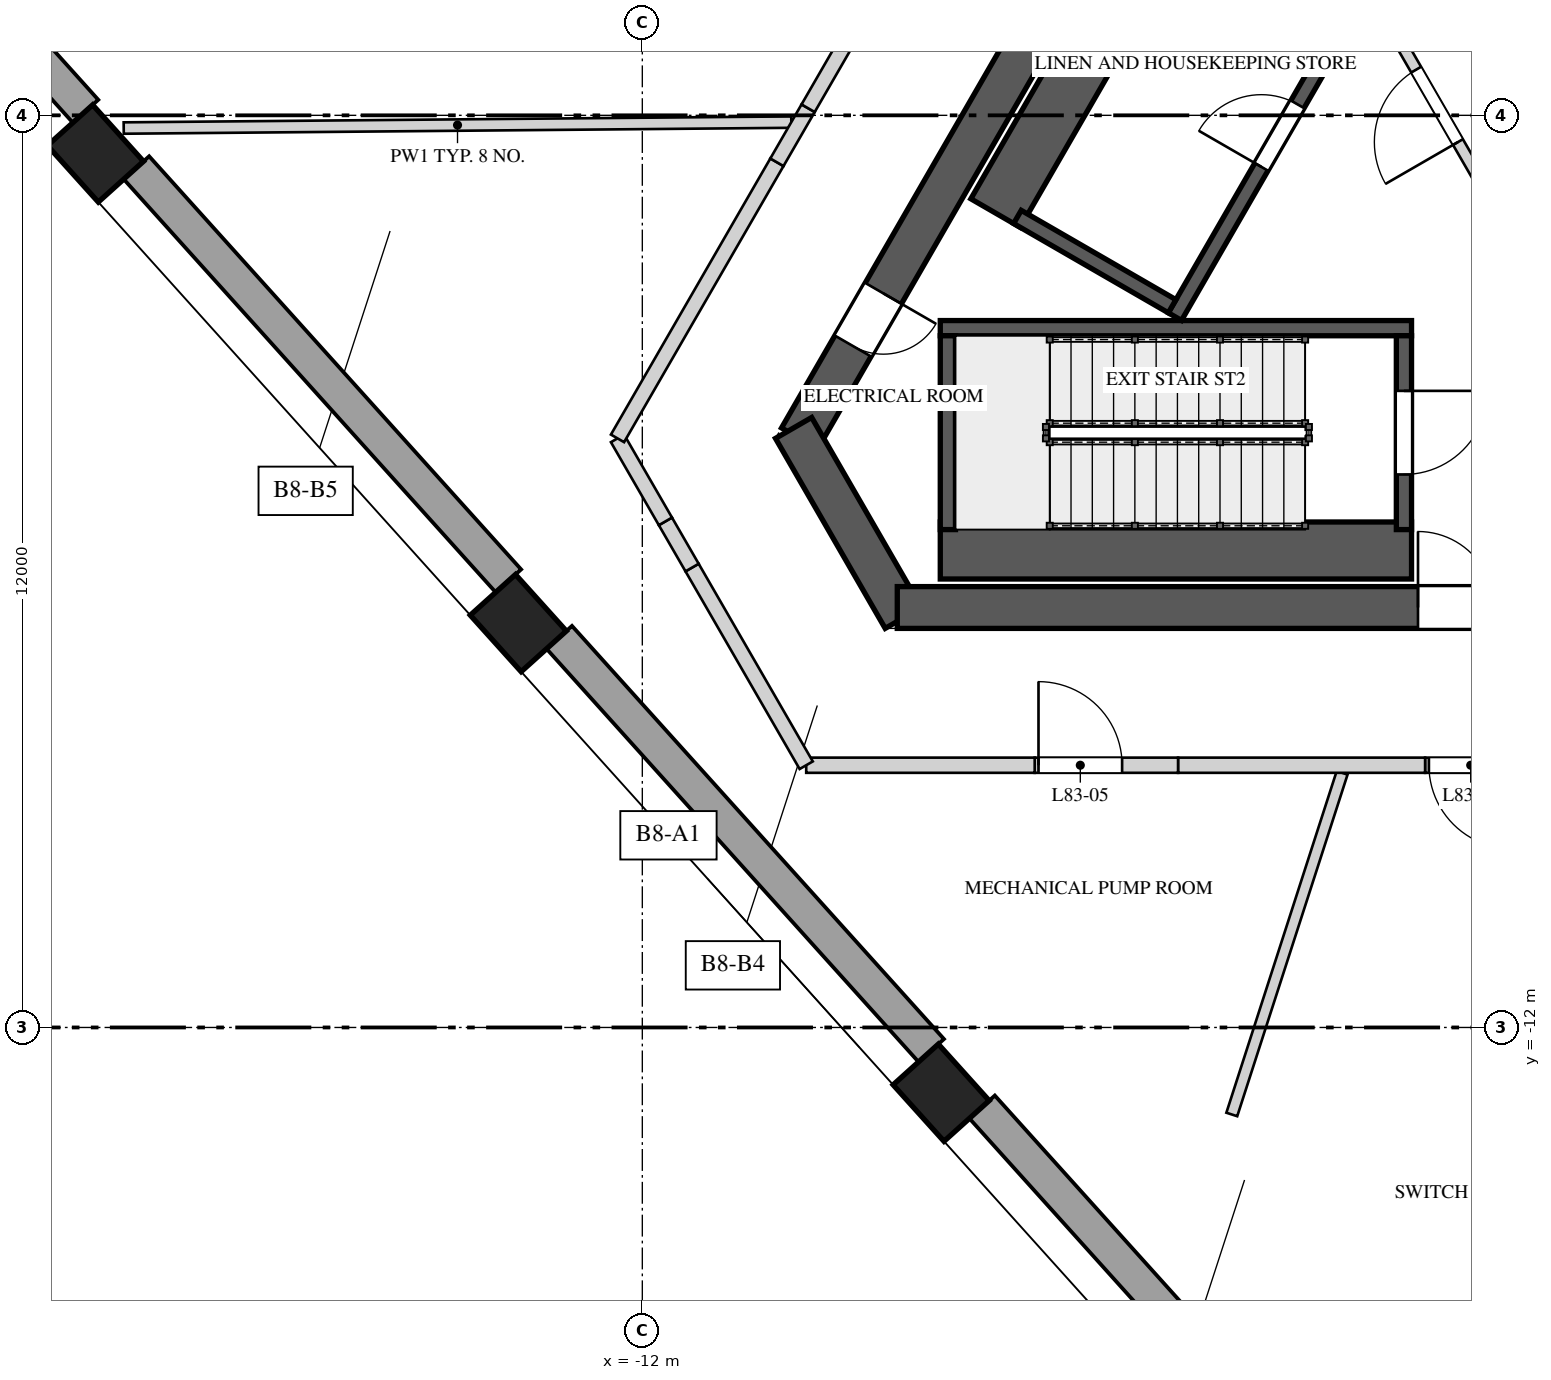
"""IFC4 building model, lengths in metres.
Left out: names, types, materials, properties, quantities, classifications, styles, units other than length and angle.
Written with IfcOpenShell. Run it as: python <this file> out.ifc"""

import sys

from ifc_helpers import new_model, si_unit, direction, frame, frame_2d, origin, origin_2d, place, context, subcontext, project, spatial, polyline, rectangle, outline, extrude, element, fill, save


model = new_model("IFC4")
c1 = context("Model", 3, precision=1e-05, world=origin(), true_north=direction((0.0, 1.0)))
c2 = subcontext(c1, "Body", "Model", "MODEL_VIEW")
j1 = project(units=[si_unit("LENGTHUNIT", "METRE"), si_unit("PLANEANGLEUNIT", "RADIAN")], contexts=[c1])
p1 = place(None, origin())
s1 = spatial("IfcSite", under=j1, at=p1, CompositionType="ELEMENT")
p2 = place(p1, origin())
s2 = spatial("IfcBuilding", under=s1, at=p2, CompositionType="ELEMENT")
p3 = place(p2, frame((0.0, 0.0, 361.4)))
s3 = spatial("IfcBuildingStorey", under=s2, at=p3, CompositionType="ELEMENT", Elevation=361.4)
p4 = place(p3, frame((-1.285, 10.725, 0.0), z_axis=(0.0, 0.0, 1.0), x_axis=(-0.499994590896, -0.86602852671, 0.0)))
e1 = element("IfcWall", 1, at=p4, inside=s3, PredefinedType="SHEAR", context=c2, shape_type="SweptSolid", body=[
    extrude(rectangle(XDim=17.292, YDim=0.55, at=frame_2d((8.646, 0.0))), origin(), (0.0, 0.0, 1.0), 4.5),
])
p5 = place(p4, frame((6.851, 0.0, 0.0)))
e2 = element("IfcOpeningElement", 2, at=p5, cuts=e1, PredefinedType="OPENING", context=c2, shape_type="SweptSolid", body=[
    extrude(rectangle(XDim=1.0, YDim=2.4, at=frame_2d((0.5, 1.2))), frame((0.0, 0.285, 0.0), z_axis=(0.0, -1.0, 0.0), x_axis=(1.0, 0.0, 0.0)), (0.0, 0.0, 1.0), 0.57),
])
p6 = place(p4, frame((15.089, 0.0, 0.0)))
e3 = element("IfcOpeningElement", 3, at=p6, cuts=e1, PredefinedType="OPENING", context=c2, shape_type="SweptSolid", body=[
    extrude(rectangle(XDim=0.8, YDim=2.1, at=frame_2d((0.4, 1.05))), frame((0.0, 0.285, 0.0), z_axis=(0.0, -1.0, 0.0), x_axis=(1.0, 0.0, 0.0)), (0.0, 0.0, 1.0), 0.57),
])
p7 = place(p3, frame((-10.01, -4.113, 0.0), z_axis=(0.0, 0.0, 1.0), x_axis=(0.499995765644, -0.866027848477, 0.0)))
e4 = element("IfcWall", 4, at=p7, inside=s3, PredefinedType="SHEAR", context=c2, shape_type="SweptSolid", body=[
    extrude(rectangle(XDim=2.887, YDim=0.55, at=frame_2d((1.443, 0.0))), origin(), (0.0, 0.0, 1.0), 4.5),
])
p8 = place(p3, frame((-8.646, -6.475, 0.0), z_axis=(0.0, 0.0, 1.0), x_axis=(1.0, 0.0, 0.0)))
e5 = element("IfcWall", 5, at=p8, inside=s3, PredefinedType="SHEAR", context=c2, shape_type="SweptSolid", body=[
    extrude(rectangle(XDim=17.292, YDim=0.55, at=frame_2d((8.646, 0.0))), origin(), (0.0, 0.0, 1.0), 4.5),
])
p9 = place(p8, frame((6.851, 0.0, 0.0)))
e6 = element("IfcOpeningElement", 6, at=p9, cuts=e5, PredefinedType="OPENING", context=c2, shape_type="SweptSolid", body=[
    extrude(rectangle(XDim=1.0, YDim=2.4, at=frame_2d((0.5, 1.2))), frame((0.0, 0.285, 0.0), z_axis=(0.0, -1.0, 0.0), x_axis=(1.0, 0.0, 0.0)), (0.0, 0.0, 1.0), 0.57),
])
for number, where, z_axis, x_axis in (
    (7, (-19.195, -0.502, 0.0), (0.0, 0.0, 1.0), (0.669, -0.743, 0.0)),
    (8, (-13.631, -6.68, 0.0), (0.0, 0.0, 1.0), (0.669, -0.743, 0.0)),
    (9, (-8.068, -12.858, 0.0), (0.0, 0.0, 1.0), (0.669, -0.743, 0.0)),
):
    element("IfcColumn", number, at=place(p3, frame(where, z_axis=z_axis, x_axis=x_axis)), inside=s3, PredefinedType="COLUMN", context=c2, shape_type="SweptSolid", body=[
        extrude(rectangle(XDim=1.0, YDim=0.8, at=origin_2d()), origin(), (0.0, 0.0, 1.0), 4.5),
    ])
p10 = place(p3, frame((-23.817, 5.043, 0.0), z_axis=(0.0, 0.0, 1.0), x_axis=(0.669137493687, -0.743138624041, 0.0)))
e10 = element("IfcWall", 10, at=p10, inside=s3, PredefinedType="SOLIDWALL", context=c2, shape_type="SweptSolid", body=[
    extrude(rectangle(XDim=6.714, YDim=0.45, at=frame_2d((3.357, 0.0))), origin(), (0.0, 0.0, 1.0), 3.8),
])
p11 = place(p3, frame((-18.656, -0.689, 0.0), z_axis=(0.0, 0.0, 1.0), x_axis=(0.669117789535, -0.743156365598, 0.0)))
e11 = element("IfcWall", 11, at=p11, inside=s3, PredefinedType="SOLIDWALL", context=c2, shape_type="SweptSolid", body=[
    extrude(rectangle(XDim=7.314, YDim=0.45, at=frame_2d((3.657, 0.0))), origin(), (0.0, 0.0, 1.0), 3.8),
])
p12 = place(p3, frame((-13.093, -6.868, 0.0), z_axis=(0.0, 0.0, 1.0), x_axis=(0.669136224502, -0.74313976684, 0.0)))
e12 = element("IfcWall", 12, at=p12, inside=s3, PredefinedType="SOLIDWALL", context=c2, shape_type="SweptSolid", body=[
    extrude(rectangle(XDim=7.314, YDim=0.45, at=frame_2d((3.657, 0.0))), origin(), (0.0, 0.0, 1.0), 3.8),
])
p13 = place(p3, frame((-7.53, -13.046, 0.0), z_axis=(0.0, 0.0, 1.0), x_axis=(0.669152823362, -0.743124820597, 0.0)))
e13 = element("IfcWall", 13, at=p13, inside=s3, PredefinedType="SOLIDWALL", context=c2, shape_type="SweptSolid", body=[
    extrude(rectangle(XDim=7.314, YDim=0.45, at=frame_2d((3.657, 0.0))), origin(), (0.0, 0.0, 1.0), 3.8),
])
p14 = place(p3, frame((-8.08, -5.725, 0.0), z_axis=(0.0, 0.0, 1.0), x_axis=(1.0, 0.0, 0.0)))
e14 = element("IfcWall", 14, at=p14, inside=s3, PredefinedType="SOLIDWALL", context=c2, shape_type="SweptSolid", body=[
    extrude(rectangle(XDim=6.2, YDim=0.75, at=frame_2d((3.1, 0.0))), origin(), (0.0, 0.0, 1.0), 4.15),
])
p15 = place(p3, frame((-8.08, -2.8, 0.0), z_axis=(0.0, 0.0, 1.0), x_axis=(1.0, 0.0, 0.0)))
e15 = element("IfcWall", 15, at=p15, inside=s3, PredefinedType="SOLIDWALL", context=c2, shape_type="SweptSolid", body=[
    extrude(rectangle(XDim=6.2, YDim=0.2, at=frame_2d((3.1, 0.0))), origin(), (0.0, 0.0, 1.0), 4.15),
])
p16 = place(p3, frame((-7.98, -2.9, 0.0), z_axis=(0.0, 0.0, 1.0), x_axis=(0.0, -1.0, 0.0)))
e16 = element("IfcWall", 16, at=p16, inside=s3, PredefinedType="SOLIDWALL", context=c2, shape_type="SweptSolid", body=[
    extrude(rectangle(XDim=2.55, YDim=0.2, at=frame_2d((1.275, 0.0))), origin(), (0.0, 0.0, 1.0), 4.15),
])
p17 = place(p3, frame((-1.98, -2.9, 0.0), z_axis=(0.0, 0.0, 1.0), x_axis=(0.0, -1.0, 0.0)))
e17 = element("IfcWall", 17, at=p17, inside=s3, PredefinedType="SOLIDWALL", context=c2, shape_type="SweptSolid", body=[
    extrude(rectangle(XDim=2.55, YDim=0.2, at=frame_2d((1.275, 0.0))), origin(), (0.0, 0.0, 1.0), 4.15),
])
p18 = place(p17, frame((0.725, 0.0, 0.0)))
e18 = element("IfcOpeningElement", 18, at=p18, cuts=e17, PredefinedType="OPENING", context=c2, shape_type="SweptSolid", body=[
    extrude(rectangle(XDim=1.1, YDim=2.4, at=frame_2d((0.55, 1.2))), frame((0.0, 0.11, 0.0), z_axis=(0.0, -1.0, 0.0), x_axis=(1.0, 0.0, 0.0)), (0.0, 0.0, 1.0), 0.22),
])
p19 = place(p3, frame((-4.993, -2.648, 0.0), z_axis=(0.0, 0.0, 1.0), x_axis=(0.499996545922, 0.866027397988, 0.0)))
e19 = element("IfcWall", 19, at=p19, inside=s3, PredefinedType="SOLIDWALL", context=c2, shape_type="SweptSolid", body=[
    extrude(rectangle(XDim=5.5, YDim=0.2, at=frame_2d((2.75, 0.0))), origin(), (0.0, 0.0, 1.0), 4.15),
])
p20 = place(p19, frame((2.275, 0.0, 0.0)))
e20 = element("IfcOpeningElement", 20, at=p20, cuts=e19, PredefinedType="OPENING", context=c2, shape_type="SweptSolid", body=[
    extrude(rectangle(XDim=0.95, YDim=2.4, at=frame_2d((0.475, 1.2))), frame((0.0, 0.11, 0.0), z_axis=(0.0, -1.0, 0.0), x_axis=(1.0, 0.0, 0.0)), (0.0, 0.0, 1.0), 0.22),
])
p21 = place(p3, frame((-4.603, 3.477, 0.0), z_axis=(0.0, 0.0, 1.0), x_axis=(-0.500015767406, -0.866016300277, 0.0)))
e21 = element("IfcWall", 21, at=p21, inside=s3, PredefinedType="SOLIDWALL", context=c2, shape_type="SweptSolid", body=[
    extrude(rectangle(XDim=5.5, YDim=0.75, at=frame_2d((2.75, 0.0))), origin(), (0.0, 0.0, 1.0), 4.15),
])
p22 = place(p3, frame((-5.03, -2.512, 0.0), z_axis=(0.0, 0.0, 1.0), x_axis=(-0.866016039709, 0.500016218704, 0.0)))
e22 = element("IfcWall", 22, at=p22, inside=s3, PredefinedType="SOLIDWALL", context=c2, shape_type="SweptSolid", body=[
    extrude(rectangle(XDim=2.35, YDim=0.2, at=frame_2d((1.175, 0.0))), origin(), (0.0, 0.0, 1.0), 4.15),
])
p23 = place(p3, frame((-0.744, -1.261, 0.0), z_axis=(0.0, 0.0, 1.0), x_axis=(-0.500004234368, 0.866022959057, 0.0)))
e23 = element("IfcWall", 23, at=p23, inside=s3, PredefinedType="PARTITIONING", context=c2, shape_type="SweptSolid", body=[
    extrude(rectangle(XDim=3.125, YDim=0.15, at=frame_2d((1.562, 0.0))), origin(), (0.0, 0.0, 1.0), 4.15),
])
p24 = place(p23, frame((1.05, 0.0, 0.0)))
e24 = element("IfcOpeningElement", 24, at=p24, cuts=e23, PredefinedType="OPENING", context=c2, shape_type="SweptSolid", body=[
    extrude(rectangle(XDim=1.1, YDim=2.4, at=frame_2d((0.55, 1.2))), frame((0.0, 0.085, 0.0), z_axis=(0.0, -1.0, 0.0), x_axis=(1.0, 0.0, 0.0)), (0.0, 0.0, 1.0), 0.17),
])
p25 = place(p3, frame((-10.04, -0.089, 0.0), z_axis=(0.0, 0.0, 1.0), x_axis=(-0.999960441248, -0.00889471414, 0.0)))
e25 = element("IfcWall", 25, at=p25, inside=s3, PredefinedType="PARTITIONING", context=c2, shape_type="SweptSolid", body=[
    extrude(rectangle(XDim=8.783, YDim=0.15, at=frame_2d((4.392, 0.0))), origin(), (0.0, 0.0, 1.0), 3.45),
])
p26 = place(p3, frame((-2.793, -8.65, 0.0), z_axis=(0.0, 0.0, 1.0), x_axis=(-0.307297266893, -0.951613571656, 0.0)))
e26 = element("IfcWall", 26, at=p26, inside=s3, PredefinedType="PARTITIONING", context=c2, shape_type="SweptSolid", body=[
    extrude(rectangle(XDim=4.723, YDim=0.15, at=frame_2d((2.362, 0.0))), origin(), (0.0, 0.0, 1.0), 4.15),
])
p27 = place(p3, frame((-0.501, -8.55, 0.0), z_axis=(0.0, 0.0, 1.0), x_axis=(-1.0, 0.0, 0.0)))
e27 = element("IfcWall", 27, at=p27, inside=s3, PredefinedType="SOLIDWALL", context=c2, shape_type="SweptSolid", body=[
    extrude(outline(polyline([(0.0, 0.0), (1.2, 0.0), (1.2, 4.15), (1.027, 4.15), (1.027, 3.25), (0.22, 3.25), (0.22, 4.15), (0.0, 4.15), (0.0, 0.0)])), frame((0.0, 0.1, 0.0), z_axis=(0.0, -1.0, 0.0), x_axis=(1.0, 0.0, 0.0)), (0.0, 0.0, 1.0), 0.2),
])
p28 = place(p27, frame((0.05, 0.0, 0.0)))
e28 = element("IfcOpeningElement", 28, at=p28, cuts=e27, PredefinedType="OPENING", context=c2, shape_type="SweptSolid", body=[
    extrude(rectangle(XDim=1.1, YDim=2.4, at=frame_2d((0.55, 1.2))), frame((0.0, 0.11, 0.0), z_axis=(0.0, -1.0, 0.0), x_axis=(1.0, 0.0, 0.0)), (0.0, 0.0, 1.0), 0.22),
])
p29 = place(p3, frame((-1.701, -8.55, 0.0), z_axis=(0.0, 0.0, 1.0), x_axis=(-1.0, 0.0, 0.0)))
e29 = element("IfcWall", 29, at=p29, inside=s3, PredefinedType="SOLIDWALL", context=c2, shape_type="SweptSolid", body=[
    extrude(rectangle(XDim=3.25, YDim=0.2, at=frame_2d((1.625, 0.0))), origin(), (0.0, 0.0, 1.0), 4.15),
])
p30 = place(p3, frame((-6.838, -8.55, 0.0), z_axis=(0.0, 0.0, 1.0), x_axis=(1.0, 0.0, 0.0)))
e30 = element("IfcWall", 30, at=p30, inside=s3, PredefinedType="SOLIDWALL", context=c2, shape_type="SweptSolid", body=[
    extrude(outline(polyline([(0.0, 0.0), (1.886, 0.0), (1.886, 3.45), (1.06, 3.45), (1.06, 4.15), (0.0, 4.15), (0.0, 0.0)])), frame((0.0, 0.1, 0.0), z_axis=(0.0, -1.0, 0.0), x_axis=(1.0, 0.0, 0.0)), (0.0, 0.0, 1.0), 0.2),
])
p31 = place(p30, frame((0.05, 0.0, 0.0)))
e31 = element("IfcOpeningElement", 31, at=p31, cuts=e30, PredefinedType="OPENING", context=c2, shape_type="SweptSolid", body=[
    extrude(rectangle(XDim=1.1, YDim=2.4, at=frame_2d((0.55, 1.2))), frame((0.0, 0.11, 0.0), z_axis=(0.0, -1.0, 0.0), x_axis=(1.0, 0.0, 0.0)), (0.0, 0.0, 1.0), 0.22),
])
p32 = place(p3, frame((-6.838, -8.55, 0.0), z_axis=(0.0, 0.0, 1.0), x_axis=(-1.0, 0.0, 0.0)))
e32 = element("IfcWall", 32, at=p32, inside=s3, PredefinedType="SOLIDWALL", context=c2, shape_type="SweptSolid", body=[
    extrude(rectangle(XDim=3.006, YDim=0.2, at=frame_2d((1.503, 0.0))), origin(), (0.0, 0.0, 1.0), 4.15),
])
p33 = place(p3, frame((-9.844, -8.55, 0.0), z_axis=(0.0, 0.0, 1.0), x_axis=(-0.500003959331, 0.866023117852, 0.0)))
e33 = element("IfcWall", 33, at=p33, inside=s3, PredefinedType="SOLIDWALL", context=c2, shape_type="SweptSolid", body=[
    extrude(rectangle(XDim=3.003, YDim=0.2, at=frame_2d((1.501, 0.0))), origin(), (0.0, 0.0, 1.0), 4.15),
])
p34 = place(p3, frame((-11.345, -5.949, 0.0), z_axis=(0.0, 0.0, 1.0), x_axis=(-0.499993523031, 0.866029143232, 0.0)))
e34 = element("IfcWall", 34, at=p34, inside=s3, PredefinedType="SOLIDWALL", context=c2, shape_type="SweptSolid", body=[
    extrude(rectangle(XDim=0.702, YDim=0.2, at=frame_2d((0.351, 0.0))), origin(), (0.0, 0.0, 1.0), 3.45),
])
p35 = place(p3, frame((-11.696, -5.342, 0.0), z_axis=(0.0, 0.0, 1.0), x_axis=(-0.500013012896, 0.866017890655, 0.0)))
e35 = element("IfcWall", 35, at=p35, inside=s3, PredefinedType="SOLIDWALL", context=c2, shape_type="SweptSolid", body=[
    extrude(rectangle(XDim=1.261, YDim=0.2, at=frame_2d((0.63, 0.0))), origin(), (0.0, 0.0, 1.0), 4.15),
])
p36 = place(p3, frame((-12.326, -4.25, 0.0), z_axis=(0.0, 0.0, 1.0), x_axis=(0.499982771656, 0.866035350345, 0.0)))
e36 = element("IfcWall", 36, at=p36, inside=s3, PredefinedType="SOLIDWALL", context=c2, shape_type="SweptSolid", body=[
    extrude(rectangle(XDim=4.195, YDim=0.2, at=frame_2d((2.097, 0.0))), origin(), (0.0, 0.0, 1.0), 4.15),
])
p37 = place(p3, frame((-10.229, -0.617, 0.0), z_axis=(0.0, 0.0, 1.0), x_axis=(0.5001686003, 0.865928040471, 0.0)))
e37 = element("IfcWall", 37, at=p37, inside=s3, PredefinedType="SOLIDWALL", context=c2, shape_type="SweptSolid", body=[
    extrude(rectangle(XDim=0.821, YDim=0.2, at=frame_2d((0.411, 0.0))), origin(), (0.0, 0.0, 1.0), 3.45),
])
p38 = place(p3, frame((-9.819, 0.094, 0.0), z_axis=(0.0, 0.0, 1.0), x_axis=(0.500007335828, 0.866021168401, 0.0)))
e38 = element("IfcWall", 38, at=p38, inside=s3, PredefinedType="SOLIDWALL", context=c2, shape_type="SweptSolid", body=[
    extrude(rectangle(XDim=1.385, YDim=0.2, at=frame_2d((0.692, 0.0))), origin(), (0.0, 0.0, 1.0), 4.15),
])
p39 = place(p18, origin())
e39 = element("IfcDoor", 39, at=p39, inside=s3, OperationType="SINGLE_SWING_LEFT", PredefinedType="DOOR", context=c2, shape_type="SweptSolid", body=[
    extrude(rectangle(XDim=1.1, YDim=2.4, at=frame_2d((0.55, 1.2))), frame((0.0, 0.025, 0.0), z_axis=(0.0, -1.0, 0.0), x_axis=(1.0, 0.0, 0.0)), (0.0, 0.0, 1.0), 0.05),
])
fill(e18, e39)
p40 = place(p20, origin())
e40 = element("IfcDoor", 40, at=p40, inside=s3, OperationType="SINGLE_SWING_LEFT", PredefinedType="DOOR", context=c2, shape_type="SweptSolid", body=[
    extrude(rectangle(XDim=0.95, YDim=2.4, at=frame_2d((0.475, 1.2))), frame((0.0, 0.025, 0.0), z_axis=(0.0, -1.0, 0.0), x_axis=(1.0, 0.0, 0.0)), (0.0, 0.0, 1.0), 0.05),
])
fill(e20, e40)
p41 = place(p24, origin())
e41 = element("IfcDoor", 41, at=p41, inside=s3, OperationType="SINGLE_SWING_LEFT", PredefinedType="DOOR", context=c2, shape_type="SweptSolid", body=[
    extrude(rectangle(XDim=1.1, YDim=2.4, at=frame_2d((0.55, 1.2))), frame((0.0, 0.025, 0.0), z_axis=(0.0, -1.0, 0.0), x_axis=(1.0, 0.0, 0.0)), (0.0, 0.0, 1.0), 0.05),
])
fill(e24, e41)
p42 = place(p9, origin())
e42 = element("IfcDoor", 42, at=p42, inside=s3, OperationType="SINGLE_SWING_LEFT", PredefinedType="DOOR", context=c2, shape_type="SweptSolid", body=[
    extrude(rectangle(XDim=1.0, YDim=2.4, at=frame_2d((0.5, 1.2))), frame((0.0, 0.025, 0.0), z_axis=(0.0, -1.0, 0.0), x_axis=(1.0, 0.0, 0.0)), (0.0, 0.0, 1.0), 0.05),
])
fill(e6, e42)
p43 = place(p6, origin())
e43 = element("IfcDoor", 43, at=p43, inside=s3, OperationType="SINGLE_SWING_LEFT", PredefinedType="DOOR", context=c2, shape_type="SweptSolid", body=[
    extrude(rectangle(XDim=0.8, YDim=2.1, at=frame_2d((0.4, 1.05))), frame((0.0, 0.025, 0.0), z_axis=(0.0, -1.0, 0.0), x_axis=(1.0, 0.0, 0.0)), (0.0, 0.0, 1.0), 0.05),
])
fill(e3, e43)
p44 = place(p31, origin())
e44 = element("IfcDoor", 44, at=p44, inside=s3, OperationType="SINGLE_SWING_RIGHT", PredefinedType="DOOR", context=c2, shape_type="SweptSolid", body=[
    extrude(rectangle(XDim=1.1, YDim=2.4, at=frame_2d((0.55, 1.2))), frame((0.0, 0.025, 0.0), z_axis=(0.0, -1.0, 0.0), x_axis=(1.0, 0.0, 0.0)), (0.0, 0.0, 1.0), 0.05),
])
fill(e31, e44)
p45 = place(p28, origin())
e45 = element("IfcDoor", 45, at=p45, inside=s3, OperationType="SINGLE_SWING_LEFT", PredefinedType="DOOR", context=c2, shape_type="SweptSolid", body=[
    extrude(rectangle(XDim=1.1, YDim=2.4, at=frame_2d((0.55, 1.2))), frame((0.0, 0.025, 0.0), z_axis=(0.0, -1.0, 0.0), x_axis=(1.0, 0.0, 0.0)), (0.0, 0.0, 1.0), 0.05),
])
fill(e28, e45)
save(model, sys.argv[1])
